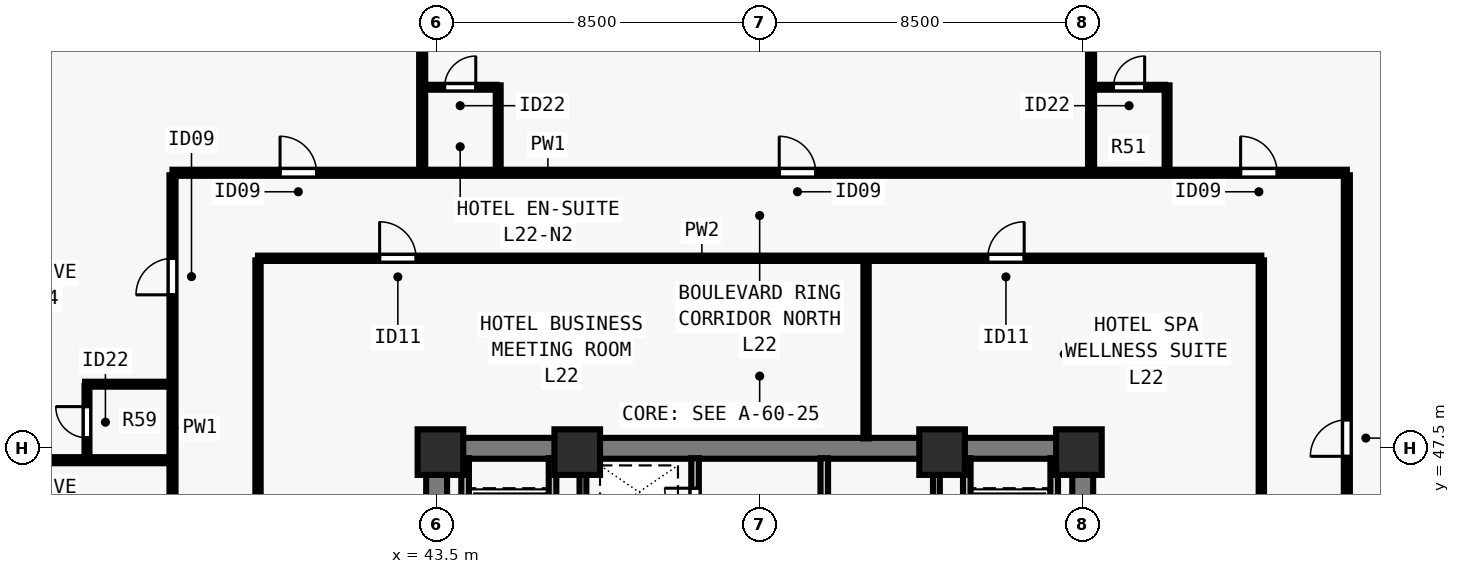
"""IFC4 building model, lengths in metres.
Left out: names, types, materials, properties, quantities, classifications, styles, units other than length and angle.
Written with IfcOpenShell. Run it as: python <this file> out.ifc"""

import sys

from ifc_helpers import new_model, si_unit, direction, frame, frame_2d, origin, origin_2d, place, context, subcontext, project, spatial, rectangle, extrude, element, fill, save


model = new_model("IFC4")
c1 = context("Model", 3, precision=1e-05, world=origin(), true_north=direction((0.0, 1.0)))
c2 = subcontext(c1, "Body", "Model", "MODEL_VIEW")
j1 = project(units=[si_unit("LENGTHUNIT", "METRE"), si_unit("PLANEANGLEUNIT", "RADIAN")], contexts=[c1])
p1 = place(None, origin())
s1 = spatial("IfcSite", under=j1, at=p1, CompositionType="ELEMENT")
p2 = place(p1, origin())
s2 = spatial("IfcBuilding", under=s1, at=p2, CompositionType="ELEMENT")
p3 = place(p2, frame((0.0, 0.0, 83.0)))
s3 = spatial("IfcBuildingStorey", under=s2, at=p3, CompositionType="ELEMENT", Elevation=83.0)
for number, where, z_axis, x_axis in (
    (1, (43.6, 47.4, 0.0), (0.0, 0.0, 1.0), (1.0, 0.0, 0.0)),
    (2, (47.2, 47.4, 0.0), (0.0, 0.0, 1.0), (1.0, 0.0, 0.0)),
    (3, (56.8, 47.4, 0.0), (0.0, 0.0, 1.0), (1.0, 0.0, 0.0)),
    (4, (60.4, 47.4, 0.0), (0.0, 0.0, 1.0), (1.0, 0.0, 0.0)),
):
    element("IfcColumn", number, at=place(p3, frame(where, z_axis=z_axis, x_axis=x_axis)), inside=s3, PredefinedType="COLUMN", context=c2, shape_type="SweptSolid", body=[
        extrude(rectangle(XDim=1.2, YDim=1.2, at=origin_2d()), origin(), (0.0, 0.0, 1.0), 3.5),
    ])
p4 = place(p3, frame((43.225, 47.5, 0.0), z_axis=(0.0, 0.0, 1.0), x_axis=(1.0, 0.0, 0.0)))
e5 = element("IfcWall", 5, at=p4, inside=s3, PredefinedType="SHEAR", context=c2, shape_type="SweptSolid", body=[
    extrude(rectangle(XDim=17.55, YDim=0.55, at=frame_2d((8.775, 0.0))), origin(), (0.0, 0.0, 1.0), 3.28),
])
for number, where, z_axis, x_axis in (
    (6, (43.5, 40.8, 0.0), (0.0, 0.0, 1.0), (0.0, 1.0, 0.0)),
    (7, (60.5, 40.8, 0.0), (0.0, 0.0, 1.0), (0.0, 1.0, 0.0)),
):
    element("IfcWall", number, at=place(p3, frame(where, z_axis=z_axis, x_axis=x_axis)), inside=s3, PredefinedType="SHEAR", context=c2, shape_type="SweptSolid", body=[
        extrude(rectangle(XDim=6.435, YDim=0.55, at=frame_2d((3.218, 0.0))), origin(), (0.0, 0.0, 1.0), 3.28),
    ])
p5 = place(p3, frame((50.3, 40.585, 0.0), z_axis=(0.0, 0.0, 1.0), x_axis=(0.0, 1.0, 0.0)))
e8 = element("IfcWall", 8, at=p5, inside=s3, PredefinedType="SOLIDWALL", context=c2, shape_type="SweptSolid", body=[
    extrude(rectangle(XDim=6.655, YDim=0.2, at=frame_2d((3.328, 0.0))), origin(), (0.0, 0.0, 1.0), 3.28),
])
p6 = place(p5, frame((5.065, 0.0, 0.0)))
e9 = element("IfcOpeningElement", 9, at=p6, cuts=e8, PredefinedType="OPENING", context=c2, shape_type="SweptSolid", body=[
    extrude(rectangle(XDim=0.8, YDim=2.08, at=frame_2d((0.4, 1.04))), frame((0.0, 0.11, 0.0), z_axis=(0.0, -1.0, 0.0), x_axis=(1.0, 0.0, 0.0)), (0.0, 0.0, 1.0), 0.22),
])
p7 = place(p3, frame((53.7, 40.585, 0.0), z_axis=(0.0, 0.0, 1.0), x_axis=(0.0, 1.0, 0.0)))
e10 = element("IfcWall", 10, at=p7, inside=s3, PredefinedType="SOLIDWALL", context=c2, shape_type="SweptSolid", body=[
    extrude(rectangle(XDim=6.655, YDim=0.2, at=frame_2d((3.328, 0.0))), origin(), (0.0, 0.0, 1.0), 3.28),
])
p8 = place(p7, frame((0.195, 0.0, 0.0)))
e11 = element("IfcOpeningElement", 11, at=p8, cuts=e10, PredefinedType="OPENING", context=c2, shape_type="SweptSolid", body=[
    extrude(rectangle(XDim=0.8, YDim=2.08, at=frame_2d((0.4, 1.04))), frame((0.0, 0.11, 0.0), z_axis=(0.0, -1.0, 0.0), x_axis=(1.0, 0.0, 0.0)), (0.0, 0.0, 1.0), 0.22),
])
p9 = place(p7, frame((4.265, 0.0, 0.0)))
e12 = element("IfcOpeningElement", 12, at=p9, cuts=e10, PredefinedType="OPENING", context=c2, shape_type="SweptSolid", body=[
    extrude(rectangle(XDim=0.95, YDim=2.12, at=frame_2d((0.475, 1.06))), frame((0.0, 0.11, 0.0), z_axis=(0.0, -1.0, 0.0), x_axis=(1.0, 0.0, 0.0)), (0.0, 0.0, 1.0), 0.22),
])
for number, where, z_axis, x_axis in (
    (13, (46.55, 43.735, 0.0), (0.0, 0.0, 1.0), (0.0, 1.0, 0.0)),
    (14, (44.25, 43.735, 0.0), (0.0, 0.0, 1.0), (0.0, 1.0, 0.0)),
    (15, (57.45, 43.735, 0.0), (0.0, 0.0, 1.0), (0.0, 1.0, 0.0)),
    (16, (59.75, 43.735, 0.0), (0.0, 0.0, 1.0), (0.0, 1.0, 0.0)),
):
    element("IfcWall", number, at=place(p3, frame(where, z_axis=z_axis, x_axis=x_axis)), inside=s3, PredefinedType="SOLIDWALL", context=c2, shape_type="SweptSolid", body=[
        extrude(rectangle(XDim=3.505, YDim=0.2, at=frame_2d((1.752, 0.0))), origin(), (0.0, 0.0, 1.0), 3.28),
    ])
for number, where, z_axis, x_axis in (
    (17, (47.35, 43.735, 0.0), (0.0, 0.0, 1.0), (0.0, 1.0, 0.0)),
    (18, (56.65, 43.735, 0.0), (0.0, 0.0, 1.0), (0.0, 1.0, 0.0)),
):
    element("IfcWall", number, at=place(p3, frame(where, z_axis=z_axis, x_axis=x_axis)), inside=s3, PredefinedType="SOLIDWALL", context=c2, shape_type="SweptSolid", body=[
        extrude(rectangle(XDim=3.505, YDim=0.18, at=frame_2d((1.752, 0.0))), origin(), (0.0, 0.0, 1.0), 3.28),
    ])
p10 = place(p3, frame((36.55, 54.75, 0.0), z_axis=(0.0, 0.0, 1.0), x_axis=(1.0, 0.0, 0.0)))
e19 = element("IfcWall", 19, at=p10, inside=s3, PredefinedType="PARTITIONING", context=c2, shape_type="SweptSolid", body=[
    extrude(rectangle(XDim=30.9, YDim=0.16, at=frame_2d((15.45, 0.0))), origin(), (0.0, 0.0, 1.0), 3.28),
])
p11 = place(p10, frame((2.83, 0.0, 0.0)))
e20 = element("IfcOpeningElement", 20, at=p11, cuts=e19, PredefinedType="OPENING", context=c2, shape_type="SweptSolid", body=[
    extrude(rectangle(XDim=0.96, YDim=2.15, at=frame_2d((0.48, 1.075))), frame((0.0, 0.09, 0.0), z_axis=(0.0, -1.0, 0.0), x_axis=(1.0, 0.0, 0.0)), (0.0, 0.0, 1.0), 0.18),
])
p12 = place(p10, frame((15.965, 0.0, 0.0)))
e21 = element("IfcOpeningElement", 21, at=p12, cuts=e19, PredefinedType="OPENING", context=c2, shape_type="SweptSolid", body=[
    extrude(rectangle(XDim=0.96, YDim=2.15, at=frame_2d((0.48, 1.075))), frame((0.0, 0.09, 0.0), z_axis=(0.0, -1.0, 0.0), x_axis=(1.0, 0.0, 0.0)), (0.0, 0.0, 1.0), 0.18),
])
p13 = place(p10, frame((28.105, 0.0, 0.0)))
e22 = element("IfcOpeningElement", 22, at=p13, cuts=e19, PredefinedType="OPENING", context=c2, shape_type="SweptSolid", body=[
    extrude(rectangle(XDim=0.96, YDim=2.15, at=frame_2d((0.48, 1.075))), frame((0.0, 0.09, 0.0), z_axis=(0.0, -1.0, 0.0), x_axis=(1.0, 0.0, 0.0)), (0.0, 0.0, 1.0), 0.18),
])
p14 = place(p3, frame((36.55, 23.315, 0.0), z_axis=(0.0, 0.0, 1.0), x_axis=(0.0, 1.0, 0.0)))
e23 = element("IfcWall", 23, at=p14, inside=s3, PredefinedType="PARTITIONING", context=c2, shape_type="SweptSolid", body=[
    extrude(rectangle(XDim=31.37, YDim=0.16, at=frame_2d((15.685, 0.0))), origin(), (0.0, 0.0, 1.0), 3.28),
])
p15 = place(p14, frame((4.848, 0.0, 0.0)))
e24 = element("IfcOpeningElement", 24, at=p15, cuts=e23, PredefinedType="OPENING", context=c2, shape_type="SweptSolid", body=[
    extrude(rectangle(XDim=0.96, YDim=2.15, at=frame_2d((0.48, 1.075))), frame((0.0, 0.09, 0.0), z_axis=(0.0, -1.0, 0.0), x_axis=(1.0, 0.0, 0.0)), (0.0, 0.0, 1.0), 0.18),
])
p16 = place(p14, frame((12.39, 0.0, 0.0)))
e25 = element("IfcOpeningElement", 25, at=p16, cuts=e23, PredefinedType="OPENING", context=c2, shape_type="SweptSolid", body=[
    extrude(rectangle(XDim=0.96, YDim=2.15, at=frame_2d((0.48, 1.075))), frame((0.0, 0.09, 0.0), z_axis=(0.0, -1.0, 0.0), x_axis=(1.0, 0.0, 0.0)), (0.0, 0.0, 1.0), 0.18),
])
p17 = place(p14, frame((20.265, 0.0, 0.0)))
e26 = element("IfcOpeningElement", 26, at=p17, cuts=e23, PredefinedType="OPENING", context=c2, shape_type="SweptSolid", body=[
    extrude(rectangle(XDim=0.96, YDim=2.15, at=frame_2d((0.48, 1.075))), frame((0.0, 0.09, 0.0), z_axis=(0.0, -1.0, 0.0), x_axis=(1.0, 0.0, 0.0)), (0.0, 0.0, 1.0), 0.18),
])
p18 = place(p14, frame((28.223, 0.0, 0.0)))
e27 = element("IfcOpeningElement", 27, at=p18, cuts=e23, PredefinedType="OPENING", context=c2, shape_type="SweptSolid", body=[
    extrude(rectangle(XDim=0.96, YDim=2.15, at=frame_2d((0.48, 1.075))), frame((0.0, 0.09, 0.0), z_axis=(0.0, -1.0, 0.0), x_axis=(1.0, 0.0, 0.0)), (0.0, 0.0, 1.0), 0.18),
])
p19 = place(p3, frame((67.45, 23.315, 0.0), z_axis=(0.0, 0.0, 1.0), x_axis=(0.0, 1.0, 0.0)))
e28 = element("IfcWall", 28, at=p19, inside=s3, PredefinedType="PARTITIONING", context=c2, shape_type="SweptSolid", body=[
    extrude(rectangle(XDim=31.37, YDim=0.16, at=frame_2d((15.685, 0.0))), origin(), (0.0, 0.0, 1.0), 3.28),
])
p20 = place(p19, frame((8.474, 0.0, 0.0)))
e29 = element("IfcOpeningElement", 29, at=p20, cuts=e28, PredefinedType="OPENING", context=c2, shape_type="SweptSolid", body=[
    extrude(rectangle(XDim=0.96, YDim=2.15, at=frame_2d((0.48, 1.075))), frame((0.0, 0.09, 0.0), z_axis=(0.0, -1.0, 0.0), x_axis=(1.0, 0.0, 0.0)), (0.0, 0.0, 1.0), 0.18),
])
p21 = place(p19, frame((23.974, 0.0, 0.0)))
e30 = element("IfcOpeningElement", 30, at=p21, cuts=e28, PredefinedType="OPENING", context=c2, shape_type="SweptSolid", body=[
    extrude(rectangle(XDim=0.96, YDim=2.15, at=frame_2d((0.48, 1.075))), frame((0.0, 0.09, 0.0), z_axis=(0.0, -1.0, 0.0), x_axis=(1.0, 0.0, 0.0)), (0.0, 0.0, 1.0), 0.18),
])
p22 = place(p3, frame((38.8, 52.5, 0.0), z_axis=(0.0, 0.0, 1.0), x_axis=(1.0, 0.0, 0.0)))
e31 = element("IfcWall", 31, at=p22, inside=s3, PredefinedType="PARTITIONING", context=c2, shape_type="SweptSolid", body=[
    extrude(rectangle(XDim=26.4, YDim=0.14, at=frame_2d((13.2, 0.0))), origin(), (0.0, 0.0, 1.0), 3.28),
])
p23 = place(p22, frame((3.2, 0.0, 0.0)))
e32 = element("IfcOpeningElement", 32, at=p23, cuts=e31, PredefinedType="OPENING", context=c2, shape_type="SweptSolid", body=[
    extrude(rectangle(XDim=0.96, YDim=2.12, at=frame_2d((0.48, 1.06))), frame((0.0, 0.08, 0.0), z_axis=(0.0, -1.0, 0.0), x_axis=(1.0, 0.0, 0.0)), (0.0, 0.0, 1.0), 0.16),
])
p24 = place(p22, frame((19.2, 0.0, 0.0)))
e33 = element("IfcOpeningElement", 33, at=p24, cuts=e31, PredefinedType="OPENING", context=c2, shape_type="SweptSolid", body=[
    extrude(rectangle(XDim=0.96, YDim=2.12, at=frame_2d((0.48, 1.06))), frame((0.0, 0.08, 0.0), z_axis=(0.0, -1.0, 0.0), x_axis=(1.0, 0.0, 0.0)), (0.0, 0.0, 1.0), 0.16),
])
p25 = place(p3, frame((38.8, 40.8, 0.0), z_axis=(0.0, 0.0, 1.0), x_axis=(0.0, 1.0, 0.0)))
e34 = element("IfcWall", 34, at=p25, inside=s3, PredefinedType="PARTITIONING", context=c2, shape_type="SweptSolid", body=[
    extrude(rectangle(XDim=11.645, YDim=0.14, at=frame_2d((5.823, 0.0))), origin(), (0.0, 0.0, 1.0), 3.28),
])
p26 = place(p25, frame((2.5, 0.0, 0.0)))
e35 = element("IfcOpeningElement", 35, at=p26, cuts=e34, PredefinedType="OPENING", context=c2, shape_type="SweptSolid", body=[
    extrude(rectangle(XDim=0.88, YDim=2.1, at=frame_2d((0.44, 1.05))), frame((0.0, 0.08, 0.0), z_axis=(0.0, -1.0, 0.0), x_axis=(1.0, 0.0, 0.0)), (0.0, 0.0, 1.0), 0.16),
])
p27 = place(p3, frame((65.2, 40.8, 0.0), z_axis=(0.0, 0.0, 1.0), x_axis=(0.0, 1.0, 0.0)))
e36 = element("IfcWall", 36, at=p27, inside=s3, PredefinedType="PARTITIONING", context=c2, shape_type="SweptSolid", body=[
    extrude(rectangle(XDim=11.645, YDim=0.14, at=frame_2d((5.823, 0.0))), origin(), (0.0, 0.0, 1.0), 3.28),
])
p28 = place(p27, frame((2.5, 0.0, 0.0)))
e37 = element("IfcOpeningElement", 37, at=p28, cuts=e36, PredefinedType="OPENING", context=c2, shape_type="SweptSolid", body=[
    extrude(rectangle(XDim=0.88, YDim=2.1, at=frame_2d((0.44, 1.05))), frame((0.0, 0.08, 0.0), z_axis=(0.0, -1.0, 0.0), x_axis=(1.0, 0.0, 0.0)), (0.0, 0.0, 1.0), 0.16),
])
p29 = place(p3, frame((54.8, 47.76, 0.0), z_axis=(0.0, 0.0, 1.0), x_axis=(0.0, 1.0, 0.0)))
e38 = element("IfcWall", 38, at=p29, inside=s3, PredefinedType="PARTITIONING", context=c2, shape_type="SweptSolid", body=[
    extrude(rectangle(XDim=4.685, YDim=0.14, at=frame_2d((2.343, 0.0))), origin(), (0.0, 0.0, 1.0), 3.28),
])
p30 = place(p3, frame((43.12, 54.815, 0.0), z_axis=(0.0, 0.0, 1.0), x_axis=(0.0, 1.0, 0.0)))
e39 = element("IfcWall", 39, at=p30, inside=s3, PredefinedType="PARTITIONING", context=c2, shape_type="SweptSolid", body=[
    extrude(rectangle(XDim=9.34, YDim=0.16, at=frame_2d((4.67, 0.0))), origin(), (0.0, 0.0, 1.0), 3.28),
])
p31 = place(p3, frame((45.12, 54.815, 0.0), z_axis=(0.0, 0.0, 1.0), x_axis=(0.0, 1.0, 0.0)))
e40 = element("IfcWall", 40, at=p31, inside=s3, PredefinedType="PLUMBINGWALL", context=c2, shape_type="SweptSolid", body=[
    extrude(rectangle(XDim=2.235, YDim=0.13, at=frame_2d((1.118, 0.0))), origin(), (0.0, 0.0, 1.0), 3.28),
])
p32 = place(p3, frame((43.185, 57.0, 0.0), z_axis=(0.0, 0.0, 1.0), x_axis=(1.0, 0.0, 0.0)))
e41 = element("IfcWall", 41, at=p32, inside=s3, PredefinedType="PLUMBINGWALL", context=c2, shape_type="SweptSolid", body=[
    extrude(rectangle(XDim=1.885, YDim=0.13, at=frame_2d((0.942, 0.0))), origin(), (0.0, 0.0, 1.0), 3.28),
])
p33 = place(p32, frame((0.525, 0.0, 0.0)))
e42 = element("IfcOpeningElement", 42, at=p33, cuts=e41, PredefinedType="OPENING", context=c2, shape_type="SweptSolid", body=[
    extrude(rectangle(XDim=0.82, YDim=2.1, at=frame_2d((0.41, 1.05))), frame((0.0, 0.075, 0.0), z_axis=(0.0, -1.0, 0.0), x_axis=(1.0, 0.0, 0.0)), (0.0, 0.0, 1.0), 0.15),
])
p34 = place(p3, frame((60.72, 54.815, 0.0), z_axis=(0.0, 0.0, 1.0), x_axis=(0.0, 1.0, 0.0)))
e43 = element("IfcWall", 43, at=p34, inside=s3, PredefinedType="PARTITIONING", context=c2, shape_type="SweptSolid", body=[
    extrude(rectangle(XDim=9.34, YDim=0.16, at=frame_2d((4.67, 0.0))), origin(), (0.0, 0.0, 1.0), 3.28),
])
p35 = place(p3, frame((62.72, 54.815, 0.0), z_axis=(0.0, 0.0, 1.0), x_axis=(0.0, 1.0, 0.0)))
e44 = element("IfcWall", 44, at=p35, inside=s3, PredefinedType="PLUMBINGWALL", context=c2, shape_type="SweptSolid", body=[
    extrude(rectangle(XDim=2.235, YDim=0.13, at=frame_2d((1.118, 0.0))), origin(), (0.0, 0.0, 1.0), 3.28),
])
p36 = place(p3, frame((60.785, 57.0, 0.0), z_axis=(0.0, 0.0, 1.0), x_axis=(1.0, 0.0, 0.0)))
e45 = element("IfcWall", 45, at=p36, inside=s3, PredefinedType="PLUMBINGWALL", context=c2, shape_type="SweptSolid", body=[
    extrude(rectangle(XDim=1.885, YDim=0.13, at=frame_2d((0.942, 0.0))), origin(), (0.0, 0.0, 1.0), 3.28),
])
p37 = place(p36, frame((0.525, 0.0, 0.0)))
e46 = element("IfcOpeningElement", 46, at=p37, cuts=e45, PredefinedType="OPENING", context=c2, shape_type="SweptSolid", body=[
    extrude(rectangle(XDim=0.82, YDim=2.1, at=frame_2d((0.41, 1.05))), frame((0.0, 0.075, 0.0), z_axis=(0.0, -1.0, 0.0), x_axis=(1.0, 0.0, 0.0)), (0.0, 0.0, 1.0), 0.15),
])
p38 = place(p3, frame((26.845, 47.187, 0.0), z_axis=(0.0, 0.0, 1.0), x_axis=(1.0, 0.0, 0.0)))
e47 = element("IfcWall", 47, at=p38, inside=s3, PredefinedType="PARTITIONING", context=c2, shape_type="SweptSolid", body=[
    extrude(rectangle(XDim=9.64, YDim=0.16, at=frame_2d((4.82, 0.0))), origin(), (0.0, 0.0, 1.0), 3.28),
])
p39 = place(p3, frame((34.25, 49.187, 0.0), z_axis=(0.0, 0.0, 1.0), x_axis=(1.0, 0.0, 0.0)))
e48 = element("IfcWall", 48, at=p39, inside=s3, PredefinedType="PLUMBINGWALL", context=c2, shape_type="SweptSolid", body=[
    extrude(rectangle(XDim=2.235, YDim=0.13, at=frame_2d((1.118, 0.0))), origin(), (0.0, 0.0, 1.0), 3.28),
])
p40 = place(p3, frame((34.3, 47.252, 0.0), z_axis=(0.0, 0.0, 1.0), x_axis=(0.0, 1.0, 0.0)))
e49 = element("IfcWall", 49, at=p40, inside=s3, PredefinedType="PLUMBINGWALL", context=c2, shape_type="SweptSolid", body=[
    extrude(rectangle(XDim=1.885, YDim=0.13, at=frame_2d((0.942, 0.0))), origin(), (0.0, 0.0, 1.0), 3.28),
])
p41 = place(p40, frame((0.525, 0.0, 0.0)))
e50 = element("IfcOpeningElement", 50, at=p41, cuts=e49, PredefinedType="OPENING", context=c2, shape_type="SweptSolid", body=[
    extrude(rectangle(XDim=0.82, YDim=2.1, at=frame_2d((0.41, 1.05))), frame((0.0, 0.075, 0.0), z_axis=(0.0, -1.0, 0.0), x_axis=(1.0, 0.0, 0.0)), (0.0, 0.0, 1.0), 0.15),
])
p42 = place(p6, origin())
e51 = element("IfcDoor", 51, at=p42, inside=s3, OperationType="SINGLE_SWING_RIGHT", PredefinedType="DOOR", context=c2, shape_type="SweptSolid", body=[
    extrude(rectangle(XDim=0.8, YDim=2.08, at=frame_2d((0.4, 1.04))), frame((0.0, 0.025, 0.0), z_axis=(0.0, -1.0, 0.0), x_axis=(1.0, 0.0, 0.0)), (0.0, 0.0, 1.0), 0.05),
])
fill(e9, e51)
p43 = place(p23, origin())
e52 = element("IfcDoor", 52, at=p43, inside=s3, OperationType="SINGLE_SWING_LEFT", PredefinedType="DOOR", context=c2, shape_type="SweptSolid", body=[
    extrude(rectangle(XDim=0.96, YDim=2.12, at=frame_2d((0.48, 1.06))), frame((0.0, 0.025, 0.0), z_axis=(0.0, -1.0, 0.0), x_axis=(1.0, 0.0, 0.0)), (0.0, 0.0, 1.0), 0.05),
])
fill(e32, e52)
p44 = place(p24, origin())
e53 = element("IfcDoor", 53, at=p44, inside=s3, OperationType="SINGLE_SWING_RIGHT", PredefinedType="DOOR", context=c2, shape_type="SweptSolid", body=[
    extrude(rectangle(XDim=0.96, YDim=2.12, at=frame_2d((0.48, 1.06))), frame((0.0, 0.025, 0.0), z_axis=(0.0, -1.0, 0.0), x_axis=(1.0, 0.0, 0.0)), (0.0, 0.0, 1.0), 0.05),
])
fill(e33, e53)
p45 = place(p11, origin())
e54 = element("IfcDoor", 54, at=p45, inside=s3, OperationType="SINGLE_SWING_LEFT", PredefinedType="DOOR", context=c2, shape_type="SweptSolid", body=[
    extrude(rectangle(XDim=0.96, YDim=2.15, at=frame_2d((0.48, 1.075))), frame((0.0, 0.025, 0.0), z_axis=(0.0, -1.0, 0.0), x_axis=(1.0, 0.0, 0.0)), (0.0, 0.0, 1.0), 0.05),
])
fill(e20, e54)
p46 = place(p33, origin())
e55 = element("IfcDoor", 55, at=p46, inside=s3, OperationType="SINGLE_SWING_RIGHT", PredefinedType="DOOR", context=c2, shape_type="SweptSolid", body=[
    extrude(rectangle(XDim=0.82, YDim=2.1, at=frame_2d((0.41, 1.05))), frame((0.0, 0.025, 0.0), z_axis=(0.0, -1.0, 0.0), x_axis=(1.0, 0.0, 0.0)), (0.0, 0.0, 1.0), 0.05),
])
fill(e42, e55)
p47 = place(p12, origin())
e56 = element("IfcDoor", 56, at=p47, inside=s3, OperationType="SINGLE_SWING_LEFT", PredefinedType="DOOR", context=c2, shape_type="SweptSolid", body=[
    extrude(rectangle(XDim=0.96, YDim=2.15, at=frame_2d((0.48, 1.075))), frame((0.0, 0.025, 0.0), z_axis=(0.0, -1.0, 0.0), x_axis=(1.0, 0.0, 0.0)), (0.0, 0.0, 1.0), 0.05),
])
fill(e21, e56)
p48 = place(p37, origin())
e57 = element("IfcDoor", 57, at=p48, inside=s3, OperationType="SINGLE_SWING_RIGHT", PredefinedType="DOOR", context=c2, shape_type="SweptSolid", body=[
    extrude(rectangle(XDim=0.82, YDim=2.1, at=frame_2d((0.41, 1.05))), frame((0.0, 0.025, 0.0), z_axis=(0.0, -1.0, 0.0), x_axis=(1.0, 0.0, 0.0)), (0.0, 0.0, 1.0), 0.05),
])
fill(e46, e57)
p49 = place(p13, origin())
e58 = element("IfcDoor", 58, at=p49, inside=s3, OperationType="SINGLE_SWING_LEFT", PredefinedType="DOOR", context=c2, shape_type="SweptSolid", body=[
    extrude(rectangle(XDim=0.96, YDim=2.15, at=frame_2d((0.48, 1.075))), frame((0.0, 0.025, 0.0), z_axis=(0.0, -1.0, 0.0), x_axis=(1.0, 0.0, 0.0)), (0.0, 0.0, 1.0), 0.05),
])
fill(e22, e58)
p50 = place(p41, origin())
e59 = element("IfcDoor", 59, at=p50, inside=s3, OperationType="SINGLE_SWING_RIGHT", PredefinedType="DOOR", context=c2, shape_type="SweptSolid", body=[
    extrude(rectangle(XDim=0.82, YDim=2.1, at=frame_2d((0.41, 1.05))), frame((0.0, 0.025, 0.0), z_axis=(0.0, -1.0, 0.0), x_axis=(1.0, 0.0, 0.0)), (0.0, 0.0, 1.0), 0.05),
])
fill(e50, e59)
p51 = place(p18, origin())
e60 = element("IfcDoor", 60, at=p51, inside=s3, OperationType="SINGLE_SWING_LEFT", PredefinedType="DOOR", context=c2, shape_type="SweptSolid", body=[
    extrude(rectangle(XDim=0.96, YDim=2.15, at=frame_2d((0.48, 1.075))), frame((0.0, 0.025, 0.0), z_axis=(0.0, -1.0, 0.0), x_axis=(1.0, 0.0, 0.0)), (0.0, 0.0, 1.0), 0.05),
])
fill(e27, e60)
p52 = place(p21, origin())
e61 = element("IfcDoor", 61, at=p52, inside=s3, OperationType="SINGLE_SWING_LEFT", PredefinedType="DOOR", context=c2, shape_type="SweptSolid", body=[
    extrude(rectangle(XDim=0.96, YDim=2.15, at=frame_2d((0.48, 1.075))), frame((0.0, 0.025, 0.0), z_axis=(0.0, -1.0, 0.0), x_axis=(1.0, 0.0, 0.0)), (0.0, 0.0, 1.0), 0.05),
])
fill(e30, e61)
save(model, sys.argv[1])
